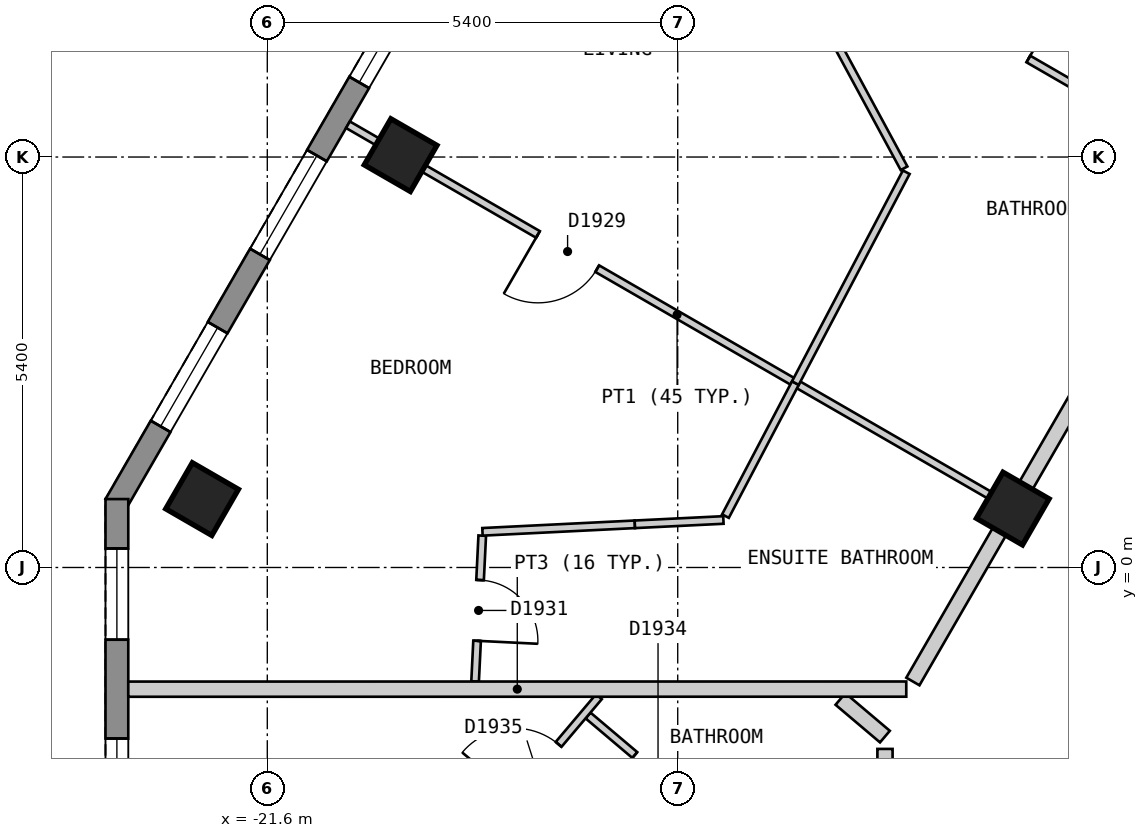
"""IFC4 building model, lengths in metres.
Left out: names, types, materials, properties, quantities, classifications, styles, units other than length and angle.
Written with IfcOpenShell. Run it as: python <this file> out.ifc"""

import sys

from ifc_helpers import new_model, si_unit, direction, frame, frame_2d, origin, origin_2d, place, context, subcontext, project, spatial, polyline, rectangle, outline, extrude, element, fill, save


model = new_model("IFC4")
c1 = context("Model", 3, precision=1e-05, world=origin(), true_north=direction((0.0, 1.0)))
c2 = subcontext(c1, "Body", "Model", "MODEL_VIEW")
j1 = project(units=[si_unit("LENGTHUNIT", "METRE"), si_unit("PLANEANGLEUNIT", "RADIAN")], contexts=[c1])
p1 = place(None, origin())
s1 = spatial("IfcSite", under=j1, at=p1, CompositionType="ELEMENT")
p2 = place(p1, origin())
s2 = spatial("IfcBuilding", under=s1, at=p2, CompositionType="ELEMENT")
p3 = place(p2, frame((0.0, 0.0, 226.8)))
s3 = spatial("IfcBuildingStorey", under=s2, at=p3, CompositionType="ELEMENT", Elevation=226.8)
for number, where, z_axis, x_axis in (
    (1, (-19.846, 5.425, 0.0), (0.0, 0.0, 1.0), (-0.5, -0.866, 0.0)),
    (2, (-22.458, 0.9, 0.0), (0.0, 0.0, 1.0), (-0.5, -0.866, 0.0)),
    (3, (-11.792, 0.775, 0.0), (0.0, 0.0, 1.0), (-0.5, -0.866, 0.0)),
):
    element("IfcColumn", number, at=place(p3, frame(where, z_axis=z_axis, x_axis=x_axis)), inside=s3, PredefinedType="COLUMN", context=c2, shape_type="SweptSolid", body=[
        extrude(rectangle(XDim=0.7, YDim=0.7, at=origin_2d()), origin(), (0.0, 0.0, 1.0), 3.0),
    ])
p4 = place(p3, frame((-12.514, 20.025, 0.0), z_axis=(0.0, 0.0, 1.0), x_axis=(-0.500003656944, -0.866023292436, 0.0)))
e4 = element("IfcWall", 4, at=p4, inside=s3, PredefinedType="SOLIDWALL", context=c2, shape_type="SweptSolid", body=[
    extrude(outline(polyline([(0.0, -0.15), (22.17, -0.15), (22.09, 0.15), (0.08, 0.15), (0.0, -0.15)])), origin(), (0.0, 0.0, 1.0), 2.7),
])
p5 = place(p4, frame((1.191, 0.0, 0.15)))
e5 = element("IfcOpeningElement", 5, at=p5, cuts=e4, PredefinedType="OPENING", context=c2, shape_type="SweptSolid", body=[
    extrude(rectangle(XDim=1.5, YDim=2.1, at=frame_2d((0.75, 1.05))), frame((0.0, 0.16, 0.0), z_axis=(0.0, -1.0, 0.0), x_axis=(1.0, 0.0, 0.0)), (0.0, 0.0, 1.0), 0.32),
])
p6 = place(p4, frame((3.804, 0.0, 0.15)))
e6 = element("IfcOpeningElement", 6, at=p6, cuts=e4, PredefinedType="OPENING", context=c2, shape_type="SweptSolid", body=[
    extrude(rectangle(XDim=1.5, YDim=2.1, at=frame_2d((0.75, 1.05))), frame((0.0, 0.16, 0.0), z_axis=(0.0, -1.0, 0.0), x_axis=(1.0, 0.0, 0.0)), (0.0, 0.0, 1.0), 0.32),
])
p7 = place(p4, frame((6.416, 0.0, 0.15)))
e7 = element("IfcOpeningElement", 7, at=p7, cuts=e4, PredefinedType="OPENING", context=c2, shape_type="SweptSolid", body=[
    extrude(rectangle(XDim=1.5, YDim=2.1, at=frame_2d((0.75, 1.05))), frame((0.0, 0.16, 0.0), z_axis=(0.0, -1.0, 0.0), x_axis=(1.0, 0.0, 0.0)), (0.0, 0.0, 1.0), 0.32),
])
p8 = place(p4, frame((9.029, 0.0, 0.15)))
e8 = element("IfcOpeningElement", 8, at=p8, cuts=e4, PredefinedType="OPENING", context=c2, shape_type="SweptSolid", body=[
    extrude(rectangle(XDim=1.5, YDim=2.1, at=frame_2d((0.75, 1.05))), frame((0.0, 0.16, 0.0), z_axis=(0.0, -1.0, 0.0), x_axis=(1.0, 0.0, 0.0)), (0.0, 0.0, 1.0), 0.32),
])
p9 = place(p4, frame((11.641, 0.0, 0.15)))
e9 = element("IfcOpeningElement", 9, at=p9, cuts=e4, PredefinedType="OPENING", context=c2, shape_type="SweptSolid", body=[
    extrude(rectangle(XDim=1.5, YDim=2.1, at=frame_2d((0.75, 1.05))), frame((0.0, 0.16, 0.0), z_axis=(0.0, -1.0, 0.0), x_axis=(1.0, 0.0, 0.0)), (0.0, 0.0, 1.0), 0.32),
])
p10 = place(p4, frame((14.254, 0.0, 0.15)))
e10 = element("IfcOpeningElement", 10, at=p10, cuts=e4, PredefinedType="OPENING", context=c2, shape_type="SweptSolid", body=[
    extrude(rectangle(XDim=1.5, YDim=2.1, at=frame_2d((0.75, 1.05))), frame((0.0, 0.16, 0.0), z_axis=(0.0, -1.0, 0.0), x_axis=(1.0, 0.0, 0.0)), (0.0, 0.0, 1.0), 0.32),
])
p11 = place(p4, frame((16.866, 0.0, 0.15)))
e11 = element("IfcOpeningElement", 11, at=p11, cuts=e4, PredefinedType="OPENING", context=c2, shape_type="SweptSolid", body=[
    extrude(rectangle(XDim=1.5, YDim=2.1, at=frame_2d((0.75, 1.05))), frame((0.0, 0.16, 0.0), z_axis=(0.0, -1.0, 0.0), x_axis=(1.0, 0.0, 0.0)), (0.0, 0.0, 1.0), 0.32),
])
p12 = place(p4, frame((19.479, 0.0, 0.15)))
e12 = element("IfcOpeningElement", 12, at=p12, cuts=e4, PredefinedType="OPENING", context=c2, shape_type="SweptSolid", body=[
    extrude(rectangle(XDim=1.5, YDim=2.1, at=frame_2d((0.75, 1.05))), frame((0.0, 0.16, 0.0), z_axis=(0.0, -1.0, 0.0), x_axis=(1.0, 0.0, 0.0)), (0.0, 0.0, 1.0), 0.32),
])
p13 = place(p3, frame((-23.579, 0.9, 0.0), z_axis=(0.0, 0.0, 1.0), x_axis=(0.0, -1.0, 0.0)))
e13 = element("IfcWall", 13, at=p13, inside=s3, PredefinedType="SOLIDWALL", context=c2, shape_type="SweptSolid", body=[
    extrude(outline(polyline([(0.0, -0.15), (5.0, -0.15), (4.92, 0.15), (0.08, 0.15), (0.0, -0.15)])), origin(), (0.0, 0.0, 1.0), 2.7),
])
p14 = place(p13, frame((0.65, 0.0, 0.15)))
e14 = element("IfcOpeningElement", 14, at=p14, cuts=e13, PredefinedType="OPENING", context=c2, shape_type="SweptSolid", body=[
    extrude(rectangle(XDim=1.2, YDim=2.1, at=frame_2d((0.6, 1.05))), frame((0.0, 0.16, 0.0), z_axis=(0.0, -1.0, 0.0), x_axis=(1.0, 0.0, 0.0)), (0.0, 0.0, 1.0), 0.32),
])
p15 = place(p13, frame((3.15, 0.0, 0.15)))
e15 = element("IfcOpeningElement", 15, at=p15, cuts=e13, PredefinedType="OPENING", context=c2, shape_type="SweptSolid", body=[
    extrude(rectangle(XDim=1.2, YDim=2.1, at=frame_2d((0.6, 1.05))), frame((0.0, 0.16, 0.0), z_axis=(0.0, -1.0, 0.0), x_axis=(1.0, 0.0, 0.0)), (0.0, 0.0, 1.0), 0.32),
])
p16 = place(p3, frame((-13.106, -1.5, 0.0), z_axis=(0.0, 0.0, 1.0), x_axis=(0.500025705601, 0.86601056214, 0.0)))
e16 = element("IfcWall", 16, at=p16, inside=s3, PredefinedType="PARTITIONING", context=c2, shape_type="SweptSolid", body=[
    extrude(rectangle(XDim=7.735, YDim=0.2, at=frame_2d((3.868, 0.0))), origin(), (0.0, 0.0, 1.0), 2.7),
])
p17 = place(p3, frame((-13.473, -2.799, 0.0), z_axis=(0.0, 0.0, 1.0), x_axis=(0.0, 1.0, 0.0)))
e17 = element("IfcWall", 17, at=p17, inside=s3, PredefinedType="PARTITIONING", context=c2, shape_type="SweptSolid", body=[
    extrude(rectangle(XDim=0.412, YDim=0.2, at=frame_2d((0.206, 0.0))), origin(), (0.0, 0.0, 1.0), 2.7),
])
p18 = place(p3, frame((-14.68, 7.947, 0.0), z_axis=(0.0, 0.0, 1.0), x_axis=(0.475823637798, -0.879540712936, 0.0)))
e18 = element("IfcWall", 18, at=p18, inside=s3, PredefinedType="PARTITIONING", context=c2, shape_type="SweptSolid", body=[
    extrude(rectangle(XDim=3.064, YDim=0.1, at=frame_2d((1.532, 0.0))), origin(), (0.0, 0.0, 1.0), 2.7),
])
p19 = place(p3, frame((-20.539, 5.825, 0.0), z_axis=(0.0, 0.0, 1.0), x_axis=(0.866047370643, -0.499961950354, 0.0)))
e19 = element("IfcWall", 19, at=p19, inside=s3, PredefinedType="PARTITIONING", context=c2, shape_type="SweptSolid", body=[
    extrude(rectangle(XDim=10.001, YDim=0.1, at=frame_2d((5.0, 0.0))), origin(), (0.0, 0.0, 1.0), 2.7),
])
p20 = place(p19, frame((2.887, 0.0, 0.0)))
e20 = element("IfcOpeningElement", 20, at=p20, cuts=e19, PredefinedType="OPENING", context=c2, shape_type="SweptSolid", body=[
    extrude(rectangle(XDim=0.9, YDim=2.1, at=frame_2d((0.45, 1.05))), frame((0.0, 0.06, 0.0), z_axis=(0.0, -1.0, 0.0), x_axis=(1.0, 0.0, 0.0)), (0.0, 0.0, 1.0), 0.12),
])
p21 = place(p3, frame((-14.47, 8.354, 0.0), z_axis=(0.0, 0.0, 1.0), x_axis=(0.866067902578, -0.499926382705, 0.0)))
e21 = element("IfcWall", 21, at=p21, inside=s3, PredefinedType="PARTITIONING", context=c2, shape_type="SweptSolid", body=[
    extrude(rectangle(XDim=5.907, YDim=0.1, at=frame_2d((2.954, 0.0))), origin(), (0.0, 0.0, 1.0), 2.7),
])
p22 = place(p21, frame((2.529, 0.0, 0.0)))
e22 = element("IfcOpeningElement", 22, at=p22, cuts=e21, PredefinedType="OPENING", context=c2, shape_type="SweptSolid", body=[
    extrude(rectangle(XDim=0.8, YDim=2.1, at=frame_2d((0.4, 1.05))), frame((0.0, 0.06, 0.0), z_axis=(0.0, -1.0, 0.0), x_axis=(1.0, 0.0, 0.0)), (0.0, 0.0, 1.0), 0.12),
])
p23 = place(p3, frame((-17.38, -1.947, 0.0), z_axis=(0.0, 0.0, 1.0), x_axis=(0.763616683524, -0.645669854217, 0.0)))
e23 = element("IfcWall", 23, at=p23, inside=s3, PredefinedType="PARTITIONING", context=c2, shape_type="SweptSolid", body=[
    extrude(rectangle(XDim=2.331, YDim=0.1, at=frame_2d((1.166, 0.0))), origin(), (0.0, 0.0, 1.0), 2.7),
])
p24 = place(p23, frame((0.806, 0.0, 0.0)))
e24 = element("IfcOpeningElement", 24, at=p24, cuts=e23, PredefinedType="OPENING", context=c2, shape_type="SweptSolid", body=[
    extrude(rectangle(XDim=0.8, YDim=2.1, at=frame_2d((0.4, 1.05))), frame((0.0, 0.06, 0.0), z_axis=(0.0, -1.0, 0.0), x_axis=(1.0, 0.0, 0.0)), (0.0, 0.0, 1.0), 0.12),
])
p25 = place(p3, frame((-20.188, -5.191, 0.0), z_axis=(0.0, 0.0, 1.0), x_axis=(0.645563873658, 0.763706281909, 0.0)))
e25 = element("IfcWall", 25, at=p25, inside=s3, PredefinedType="PARTITIONING", context=c2, shape_type="SweptSolid", body=[
    extrude(rectangle(XDim=4.571, YDim=0.1, at=frame_2d((2.286, 0.0))), origin(), (0.0, 0.0, 1.0), 2.7),
])
p26 = place(p25, frame((2.85, 0.0, 0.0)))
e26 = element("IfcOpeningElement", 26, at=p26, cuts=e25, PredefinedType="OPENING", context=c2, shape_type="SweptSolid", body=[
    extrude(rectangle(XDim=0.9, YDim=2.1, at=frame_2d((0.45, 1.05))), frame((0.0, 0.06, 0.0), z_axis=(0.0, -1.0, 0.0), x_axis=(1.0, 0.0, 0.0)), (0.0, 0.0, 1.0), 0.12),
])
p27 = place(p3, frame((-15.572, 0.676, 0.0), z_axis=(0.0, 0.0, 1.0), x_axis=(0.465298498919, 0.885153832339, 0.0)))
e27 = element("IfcWall", 27, at=p27, inside=s3, PredefinedType="PARTITIONING", context=c2, shape_type="SweptSolid", body=[
    extrude(rectangle(XDim=1.977, YDim=0.1, at=frame_2d((0.989, 0.0))), origin(), (0.0, 0.0, 1.0), 2.7),
])
p28 = place(p3, frame((-18.866, -1.5, 0.0), z_axis=(0.0, 0.0, 1.0), x_axis=(0.048923533446, 0.998802526967, 0.0)))
e28 = element("IfcWall", 28, at=p28, inside=s3, PredefinedType="PARTITIONING", context=c2, shape_type="SweptSolid", body=[
    extrude(rectangle(XDim=1.921, YDim=0.1, at=frame_2d((0.96, 0.0))), origin(), (0.0, 0.0, 1.0), 2.7),
])
p29 = place(p28, frame((0.536, 0.0, 0.0)))
e29 = element("IfcOpeningElement", 29, at=p29, cuts=e28, PredefinedType="OPENING", context=c2, shape_type="SweptSolid", body=[
    extrude(rectangle(XDim=0.8, YDim=2.1, at=frame_2d((0.4, 1.05))), frame((0.0, 0.06, 0.0), z_axis=(0.0, -1.0, 0.0), x_axis=(1.0, 0.0, 0.0)), (0.0, 0.0, 1.0), 0.12),
])
p30 = place(p3, frame((-18.769, 0.469, 0.0), z_axis=(0.0, 0.0, 1.0), x_axis=(0.998780383332, 0.049373534108, 0.0)))
e30 = element("IfcWall", 30, at=p30, inside=s3, PredefinedType="PARTITIONING", context=c2, shape_type="SweptSolid", body=[
    extrude(rectangle(XDim=2.008, YDim=0.1, at=frame_2d((1.004, 0.0))), origin(), (0.0, 0.0, 1.0), 2.7),
])
p31 = place(p3, frame((-16.764, 0.568, 0.0), z_axis=(0.0, 0.0, 1.0), x_axis=(0.998809616198, 0.048778587419, 0.0)))
e31 = element("IfcWall", 31, at=p31, inside=s3, PredefinedType="PARTITIONING", context=c2, shape_type="SweptSolid", body=[
    extrude(rectangle(XDim=1.166, YDim=0.1, at=frame_2d((0.583, 0.0))), origin(), (0.0, 0.0, 1.0), 2.7),
])
p32 = place(p3, frame((-14.059, -1.73, 0.0), z_axis=(0.0, 0.0, 1.0), x_axis=(0.763289607824, -0.64605647941, 0.0)))
e32 = element("IfcWall", 32, at=p32, inside=s3, PredefinedType="PARTITIONING", context=c2, shape_type="SweptSolid", body=[
    extrude(rectangle(XDim=0.766, YDim=0.2, at=frame_2d((0.383, 0.0))), origin(), (0.0, 0.0, 1.0), 2.7),
])
p33 = place(p3, frame((-23.429, -1.601, 0.0), z_axis=(0.0, 0.0, 1.0), x_axis=(0.999999995449, 9.5406191e-05, 0.0)))
e33 = element("IfcWall", 33, at=p33, inside=s3, PredefinedType="PARTITIONING", context=c2, shape_type="SweptSolid", body=[
    extrude(rectangle(XDim=10.236, YDim=0.2, at=frame_2d((5.118, 0.0))), origin(), (0.0, 0.0, 1.0), 2.7),
])
p34 = place(p3, frame((-14.652, 2.426, 0.0), z_axis=(0.0, 0.0, 1.0), x_axis=(0.465502421984, 0.885046606189, 0.0)))
e34 = element("IfcWall", 34, at=p34, inside=s3, PredefinedType="PARTITIONING", context=c2, shape_type="SweptSolid", body=[
    extrude(rectangle(XDim=3.134, YDim=0.1, at=frame_2d((1.567, 0.0))), origin(), (0.0, 0.0, 1.0), 2.7),
])
p35 = place(p10, origin())
e35 = element("IfcWindow", 35, at=p35, inside=s3, PartitioningType="SINGLE_PANEL", PredefinedType="WINDOW", context=c2, shape_type="SweptSolid", body=[
    extrude(rectangle(XDim=1.5, YDim=2.1, at=frame_2d((0.75, 1.05))), frame((0.0, 0.03, 0.0), z_axis=(0.0, -1.0, 0.0), x_axis=(1.0, 0.0, 0.0)), (0.0, 0.0, 1.0), 0.06),
])
fill(e10, e35)
p36 = place(p11, origin())
e36 = element("IfcWindow", 36, at=p36, inside=s3, PartitioningType="SINGLE_PANEL", PredefinedType="WINDOW", context=c2, shape_type="SweptSolid", body=[
    extrude(rectangle(XDim=1.5, YDim=2.1, at=frame_2d((0.75, 1.05))), frame((0.0, 0.03, 0.0), z_axis=(0.0, -1.0, 0.0), x_axis=(1.0, 0.0, 0.0)), (0.0, 0.0, 1.0), 0.06),
])
fill(e11, e36)
p37 = place(p12, origin())
e37 = element("IfcWindow", 37, at=p37, inside=s3, PartitioningType="SINGLE_PANEL", PredefinedType="WINDOW", context=c2, shape_type="SweptSolid", body=[
    extrude(rectangle(XDim=1.5, YDim=2.1, at=frame_2d((0.75, 1.05))), frame((0.0, 0.03, 0.0), z_axis=(0.0, -1.0, 0.0), x_axis=(1.0, 0.0, 0.0)), (0.0, 0.0, 1.0), 0.06),
])
fill(e12, e37)
p38 = place(p14, origin())
e38 = element("IfcWindow", 38, at=p38, inside=s3, PartitioningType="SINGLE_PANEL", PredefinedType="WINDOW", context=c2, shape_type="SweptSolid", body=[
    extrude(rectangle(XDim=1.2, YDim=2.1, at=frame_2d((0.6, 1.05))), frame((0.0, 0.03, 0.0), z_axis=(0.0, -1.0, 0.0), x_axis=(1.0, 0.0, 0.0)), (0.0, 0.0, 1.0), 0.06),
])
fill(e14, e38)
p39 = place(p15, origin())
e39 = element("IfcWindow", 39, at=p39, inside=s3, PartitioningType="SINGLE_PANEL", PredefinedType="WINDOW", context=c2, shape_type="SweptSolid", body=[
    extrude(rectangle(XDim=1.2, YDim=2.1, at=frame_2d((0.6, 1.05))), frame((0.0, 0.03, 0.0), z_axis=(0.0, -1.0, 0.0), x_axis=(1.0, 0.0, 0.0)), (0.0, 0.0, 1.0), 0.06),
])
fill(e15, e39)
p40 = place(p22, origin())
e40 = element("IfcDoor", 40, at=p40, inside=s3, OperationType="SINGLE_SWING_RIGHT", PredefinedType="DOOR", context=c2, shape_type="SweptSolid", body=[
    extrude(rectangle(XDim=0.8, YDim=2.1, at=frame_2d((0.4, 1.05))), frame((0.0, 0.025, 0.0), z_axis=(0.0, -1.0, 0.0), x_axis=(1.0, 0.0, 0.0)), (0.0, 0.0, 1.0), 0.05),
])
fill(e22, e40)
p41 = place(p20, origin())
e41 = element("IfcDoor", 41, at=p41, inside=s3, OperationType="SINGLE_SWING_LEFT", PredefinedType="DOOR", context=c2, shape_type="SweptSolid", body=[
    extrude(rectangle(XDim=0.9, YDim=2.1, at=frame_2d((0.45, 1.05))), frame((0.0, 0.025, 0.0), z_axis=(0.0, -1.0, 0.0), x_axis=(1.0, 0.0, 0.0)), (0.0, 0.0, 1.0), 0.05),
])
fill(e20, e41)
p42 = place(p29, origin())
e42 = element("IfcDoor", 42, at=p42, inside=s3, OperationType="SINGLE_SWING_LEFT", PredefinedType="DOOR", context=c2, shape_type="SweptSolid", body=[
    extrude(rectangle(XDim=0.8, YDim=2.1, at=frame_2d((0.4, 1.05))), frame((0.0, 0.025, 0.0), z_axis=(0.0, -1.0, 0.0), x_axis=(1.0, 0.0, 0.0)), (0.0, 0.0, 1.0), 0.05),
])
fill(e29, e42)
p43 = place(p24, origin())
e43 = element("IfcDoor", 43, at=p43, inside=s3, OperationType="SINGLE_SWING_RIGHT", PredefinedType="DOOR", context=c2, shape_type="SweptSolid", body=[
    extrude(rectangle(XDim=0.8, YDim=2.1, at=frame_2d((0.4, 1.05))), frame((0.0, 0.025, 0.0), z_axis=(0.0, -1.0, 0.0), x_axis=(1.0, 0.0, 0.0)), (0.0, 0.0, 1.0), 0.05),
])
fill(e24, e43)
p44 = place(p26, origin())
e44 = element("IfcDoor", 44, at=p44, inside=s3, OperationType="SINGLE_SWING_LEFT", PredefinedType="DOOR", context=c2, shape_type="SweptSolid", body=[
    extrude(rectangle(XDim=0.9, YDim=2.1, at=frame_2d((0.45, 1.05))), frame((0.0, 0.025, 0.0), z_axis=(0.0, -1.0, 0.0), x_axis=(1.0, 0.0, 0.0)), (0.0, 0.0, 1.0), 0.05),
])
fill(e26, e44)
save(model, sys.argv[1])
